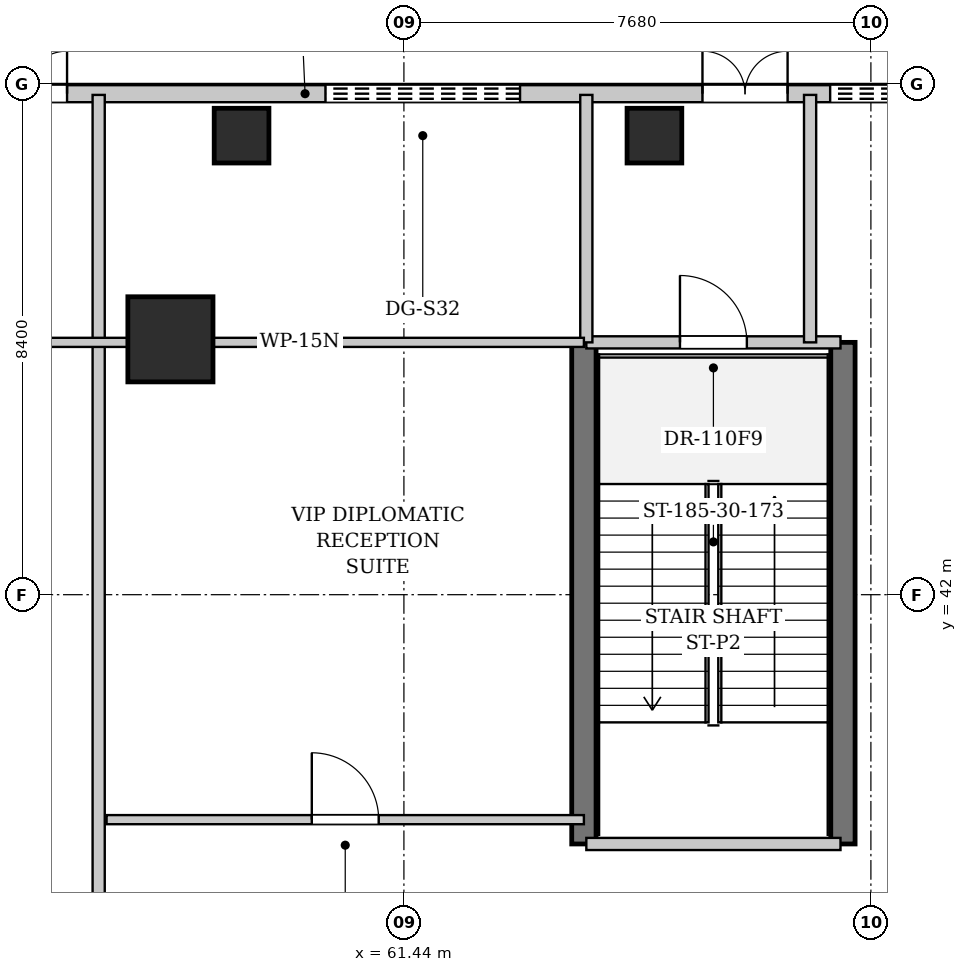
"""IFC4 building model, lengths in metres.
Left out: names, types, materials, properties, quantities, classifications, styles, units other than length and angle.
Written with IfcOpenShell. Run it as: python <this file> out.ifc"""

import sys

from ifc_helpers import new_model, si_unit, direction, frame, frame_2d, origin, origin_2d, place, context, subcontext, project, spatial, rectangle, extrude, element, fill, save


model = new_model("IFC4")
c1 = context("Model", 3, precision=1e-05, world=origin(), true_north=direction((0.0, 1.0)))
c2 = subcontext(c1, "Body", "Model", "MODEL_VIEW")
j1 = project(units=[si_unit("LENGTHUNIT", "METRE"), si_unit("PLANEANGLEUNIT", "RADIAN")], contexts=[c1])
p1 = place(None, origin())
s1 = spatial("IfcSite", under=j1, at=p1, CompositionType="ELEMENT")
p2 = place(p1, origin())
s2 = spatial("IfcBuilding", under=s1, at=p2, CompositionType="ELEMENT")
p3 = place(p2, origin())
s3 = spatial("IfcBuildingStorey", under=s2, at=p3, CompositionType="ELEMENT", Elevation=0.0)
for number, where, z_axis, x_axis in (
    (1, (64.4, 37.9, 0.0), (0.0, 0.0, 1.0), (0.0, 1.0, 0.0)),
    (2, (68.66, 37.9, 0.0), (0.0, 0.0, 1.0), (0.0, 1.0, 0.0)),
):
    element("IfcWall", number, at=place(p3, frame(where, z_axis=z_axis, x_axis=x_axis)), inside=s3, PredefinedType="SHEAR", context=c2, shape_type="SweptSolid", body=[
        extrude(rectangle(XDim=8.25, YDim=0.4, at=frame_2d((4.125, 0.0))), origin(), (0.0, 0.0, 1.0), 4.94),
    ])
p4 = place(p3, frame((57.6, 46.2, 0.0), z_axis=(0.0, 0.0, 1.0), x_axis=(1.0, 0.0, 0.0)))
e3 = element("IfcColumn", 3, at=p4, inside=s3, PredefinedType="COLUMN", context=c2, shape_type="SweptSolid", body=[
    extrude(rectangle(XDim=1.4, YDim=1.4, at=origin_2d()), origin(), (0.0, 0.0, 1.0), 5.2),
])
for number, where, z_axis, x_axis in (
    (4, (58.77, 49.55, 0.0), (0.0, 0.0, 1.0), (1.0, 0.0, 0.0)),
    (5, (65.56, 49.55, 0.0), (0.0, 0.0, 1.0), (1.0, 0.0, 0.0)),
):
    element("IfcColumn", number, at=place(p3, frame(where, z_axis=z_axis, x_axis=x_axis)), inside=s3, PredefinedType="COLUMN", context=c2, shape_type="SweptSolid", body=[
        extrude(rectangle(XDim=0.9, YDim=0.9, at=origin_2d()), origin(), (0.0, 0.0, 1.0), 5.2),
    ])
p5 = place(p3, frame((76.64, 50.24, 0.0), z_axis=(0.0, 0.0, 1.0), x_axis=(-1.0, 0.0, 0.0)))
e6 = element("IfcWall", 6, at=p5, inside=s3, PredefinedType="SOLIDWALL", context=c2, shape_type="SweptSolid", body=[
    extrude(rectangle(XDim=76.48, YDim=0.28, at=frame_2d((38.24, 0.0))), origin(), (0.0, 0.0, 1.0), 4.94),
])
p6 = place(p5, frame((69.14, 0.0, 0.0)))
e7 = element("IfcOpeningElement", 7, at=p6, cuts=e6, PredefinedType="OPENING", context=c2, shape_type="SweptSolid", body=[
    extrude(rectangle(XDim=6.2, YDim=4.5, at=frame_2d((3.1, 2.25))), frame((0.0, 0.15, 0.0), z_axis=(0.0, -1.0, 0.0), x_axis=(1.0, 0.0, 0.0)), (0.0, 0.0, 1.0), 0.3),
])
p7 = place(p5, frame((66.49, 0.0, 0.0)))
e8 = element("IfcOpeningElement", 8, at=p7, cuts=e6, PredefinedType="OPENING", context=c2, shape_type="SweptSolid", body=[
    extrude(rectangle(XDim=1.4, YDim=2.2, at=frame_2d((0.7, 1.1))), frame((0.0, 0.15, 0.0), z_axis=(0.0, -1.0, 0.0), x_axis=(1.0, 0.0, 0.0)), (0.0, 0.0, 1.0), 0.3),
])
p8 = place(p5, frame((56.39, 0.0, 0.0)))
e9 = element("IfcOpeningElement", 9, at=p8, cuts=e6, PredefinedType="OPENING", context=c2, shape_type="SweptSolid", body=[
    extrude(rectangle(XDim=1.4, YDim=2.2, at=frame_2d((0.7, 1.1))), frame((0.0, 0.15, 0.0), z_axis=(0.0, -1.0, 0.0), x_axis=(1.0, 0.0, 0.0)), (0.0, 0.0, 1.0), 0.3),
])
p9 = place(p5, frame((54.29, 0.0, 0.0)))
e10 = element("IfcOpeningElement", 10, at=p9, cuts=e6, PredefinedType="OPENING", context=c2, shape_type="SweptSolid", body=[
    extrude(rectangle(XDim=1.4, YDim=2.2, at=frame_2d((0.7, 1.1))), frame((0.0, 0.15, 0.0), z_axis=(0.0, -1.0, 0.0), x_axis=(1.0, 0.0, 0.0)), (0.0, 0.0, 1.0), 0.3),
])
p10 = place(p5, frame((20.74, 0.0, 0.0)))
e11 = element("IfcOpeningElement", 11, at=p10, cuts=e6, PredefinedType="OPENING", context=c2, shape_type="SweptSolid", body=[
    extrude(rectangle(XDim=1.4, YDim=2.2, at=frame_2d((0.7, 1.1))), frame((0.0, 0.15, 0.0), z_axis=(0.0, -1.0, 0.0), x_axis=(1.0, 0.0, 0.0)), (0.0, 0.0, 1.0), 0.3),
])
p11 = place(p5, frame((8.89, 0.0, 0.0)))
e12 = element("IfcOpeningElement", 12, at=p11, cuts=e6, PredefinedType="OPENING", context=c2, shape_type="SweptSolid", body=[
    extrude(rectangle(XDim=1.4, YDim=2.2, at=frame_2d((0.7, 1.1))), frame((0.0, 0.15, 0.0), z_axis=(0.0, -1.0, 0.0), x_axis=(1.0, 0.0, 0.0)), (0.0, 0.0, 1.0), 0.3),
])
p12 = place(p5, frame((60.09, 0.0, 0.0)))
e13 = element("IfcOpeningElement", 13, at=p12, cuts=e6, PredefinedType="OPENING", context=c2, shape_type="SweptSolid", body=[
    extrude(rectangle(XDim=3.2, YDim=3.4, at=frame_2d((1.6, 1.7))), frame((0.0, 0.15, 0.0), z_axis=(0.0, -1.0, 0.0), x_axis=(1.0, 0.0, 0.0)), (0.0, 0.0, 1.0), 0.3),
])
p13 = place(p5, frame((13.29, 0.0, 0.0)))
e14 = element("IfcOpeningElement", 14, at=p13, cuts=e6, PredefinedType="OPENING", context=c2, shape_type="SweptSolid", body=[
    extrude(rectangle(XDim=3.2, YDim=3.4, at=frame_2d((1.6, 1.7))), frame((0.0, 0.15, 0.0), z_axis=(0.0, -1.0, 0.0), x_axis=(1.0, 0.0, 0.0)), (0.0, 0.0, 1.0), 0.3),
])
p14 = place(p5, frame((4.99, 0.0, 0.0)))
e15 = element("IfcOpeningElement", 15, at=p14, cuts=e6, PredefinedType="OPENING", context=c2, shape_type="SweptSolid", body=[
    extrude(rectangle(XDim=3.2, YDim=3.4, at=frame_2d((1.6, 1.7))), frame((0.0, 0.15, 0.0), z_axis=(0.0, -1.0, 0.0), x_axis=(1.0, 0.0, 0.0)), (0.0, 0.0, 1.0), 0.3),
])
p15 = place(p3, frame((64.44, 37.9, 0.0), z_axis=(0.0, 0.0, 1.0), x_axis=(1.0, 0.0, 0.0)))
e16 = element("IfcWall", 16, at=p15, inside=s3, PredefinedType="PARTITIONING", context=c2, shape_type="SweptSolid", body=[
    extrude(rectangle(XDim=4.18, YDim=0.2, at=frame_2d((2.09, 0.0))), origin(), (0.0, 0.0, 1.0), 4.94),
])
p16 = place(p3, frame((64.44, 46.15, 0.0), z_axis=(0.0, 0.0, 1.0), x_axis=(1.0, 0.0, 0.0)))
e17 = element("IfcWall", 17, at=p16, inside=s3, PredefinedType="PARTITIONING", context=c2, shape_type="SweptSolid", body=[
    extrude(rectangle(XDim=4.18, YDim=0.2, at=frame_2d((2.09, 0.0))), origin(), (0.0, 0.0, 1.0), 4.94),
])
p17 = place(p16, frame((1.54, 0.0, 0.0)))
e18 = element("IfcOpeningElement", 18, at=p17, cuts=e17, PredefinedType="OPENING", context=c2, shape_type="SweptSolid", body=[
    extrude(rectangle(XDim=1.1, YDim=2.15, at=frame_2d((0.55, 1.075))), frame((0.0, 0.11, 0.0), z_axis=(0.0, -1.0, 0.0), x_axis=(1.0, 0.0, 0.0)), (0.0, 0.0, 1.0), 0.22),
])
for number, where, z_axis, x_axis in (
    (19, (64.44, 46.15, 0.0), (0.0, 0.0, 1.0), (0.0, 1.0, 0.0)),
    (20, (68.12, 46.15, 0.0), (0.0, 0.0, 1.0), (0.0, 1.0, 0.0)),
):
    element("IfcWall", number, at=place(p3, frame(where, z_axis=z_axis, x_axis=x_axis)), inside=s3, PredefinedType="PARTITIONING", context=c2, shape_type="SweptSolid", body=[
        extrude(rectangle(XDim=4.07, YDim=0.2, at=frame_2d((2.035, 0.0))), origin(), (0.0, 0.0, 1.0), 4.94),
    ])
p18 = place(p3, frame((56.42, 33.15, 0.0), z_axis=(0.0, 0.0, 1.0), x_axis=(0.0, 1.0, 0.0)))
e21 = element("IfcWall", 21, at=p18, inside=s3, PredefinedType="PARTITIONING", context=c2, shape_type="SweptSolid", body=[
    extrude(rectangle(XDim=17.07, YDim=0.2, at=frame_2d((8.535, 0.0))), origin(), (0.0, 0.0, 1.0), 4.94),
])
p19 = place(p3, frame((56.55, 38.3, 0.0), z_axis=(0.0, 0.0, 1.0), x_axis=(1.0, 0.0, 0.0)))
e22 = element("IfcWall", 22, at=p19, inside=s3, PredefinedType="PARTITIONING", context=c2, shape_type="SweptSolid", body=[
    extrude(rectangle(XDim=7.85, YDim=0.15, at=frame_2d((3.925, 0.0))), origin(), (0.0, 0.0, 1.0), 4.94),
])
p20 = place(p19, frame((3.375, 0.0, 0.0)))
e23 = element("IfcOpeningElement", 23, at=p20, cuts=e22, PredefinedType="OPENING", context=c2, shape_type="SweptSolid", body=[
    extrude(rectangle(XDim=1.1, YDim=2.15, at=frame_2d((0.55, 1.075))), frame((0.0, 0.085, 0.0), z_axis=(0.0, -1.0, 0.0), x_axis=(1.0, 0.0, 0.0)), (0.0, 0.0, 1.0), 0.17),
])
p21 = place(p3, frame((54.05, 46.15, 0.0), z_axis=(0.0, 0.0, 1.0), x_axis=(1.0, 0.0, 0.0)))
e24 = element("IfcWall", 24, at=p21, inside=s3, PredefinedType="PARTITIONING", context=c2, shape_type="SweptSolid", body=[
    extrude(rectangle(XDim=10.35, YDim=0.15, at=frame_2d((5.175, 0.0))), origin(), (0.0, 0.0, 1.0), 4.94),
])
p22 = place(p10, frame((1.4, 0.0, 0.0), z_axis=(0.0, 0.0, 1.0), x_axis=(-1.0, 0.0, 0.0)))
e25 = element("IfcDoor", 25, at=p22, inside=s3, OperationType="SINGLE_SWING_LEFT", PredefinedType="DOOR", context=c2, shape_type="SweptSolid", body=[
    extrude(rectangle(XDim=1.4, YDim=2.2, at=frame_2d((0.7, 1.1))), frame((0.0, 0.025, 0.0), z_axis=(0.0, -1.0, 0.0), x_axis=(1.0, 0.0, 0.0)), (0.0, 0.0, 1.0), 0.05),
])
fill(e11, e25)
p23 = place(p11, frame((1.4, 0.0, 0.0), z_axis=(0.0, 0.0, 1.0), x_axis=(-1.0, 0.0, 0.0)))
e26 = element("IfcDoor", 26, at=p23, inside=s3, OperationType="SINGLE_SWING_LEFT", PredefinedType="DOOR", context=c2, shape_type="SweptSolid", body=[
    extrude(rectangle(XDim=1.4, YDim=2.2, at=frame_2d((0.7, 1.1))), frame((0.0, 0.025, 0.0), z_axis=(0.0, -1.0, 0.0), x_axis=(1.0, 0.0, 0.0)), (0.0, 0.0, 1.0), 0.05),
])
fill(e12, e26)
p24 = place(p13, frame((3.2, 0.0, 0.0), z_axis=(0.0, 0.0, 1.0), x_axis=(-1.0, 0.0, 0.0)))
e27 = element("IfcDoor", 27, at=p24, inside=s3, OperationType="SINGLE_SWING_LEFT", PredefinedType="GATE", context=c2, shape_type="SweptSolid", body=[
    extrude(rectangle(XDim=3.2, YDim=3.4, at=frame_2d((1.6, 1.7))), frame((0.0, 0.025, 0.0), z_axis=(0.0, -1.0, 0.0), x_axis=(1.0, 0.0, 0.0)), (0.0, 0.0, 1.0), 0.05),
])
fill(e14, e27)
p25 = place(p14, frame((3.2, 0.0, 0.0), z_axis=(0.0, 0.0, 1.0), x_axis=(-1.0, 0.0, 0.0)))
e28 = element("IfcDoor", 28, at=p25, inside=s3, OperationType="SINGLE_SWING_LEFT", PredefinedType="GATE", context=c2, shape_type="SweptSolid", body=[
    extrude(rectangle(XDim=3.2, YDim=3.4, at=frame_2d((1.6, 1.7))), frame((0.0, 0.025, 0.0), z_axis=(0.0, -1.0, 0.0), x_axis=(1.0, 0.0, 0.0)), (0.0, 0.0, 1.0), 0.05),
])
fill(e15, e28)
p26 = place(p17, origin())
e29 = element("IfcDoor", 29, at=p26, inside=s3, OperationType="SINGLE_SWING_LEFT", PredefinedType="DOOR", context=c2, shape_type="SweptSolid", body=[
    extrude(rectangle(XDim=1.1, YDim=2.15, at=frame_2d((0.55, 1.075))), frame((0.0, 0.025, 0.0), z_axis=(0.0, -1.0, 0.0), x_axis=(1.0, 0.0, 0.0)), (0.0, 0.0, 1.0), 0.05),
])
fill(e18, e29)
p27 = place(p20, origin())
e30 = element("IfcDoor", 30, at=p27, inside=s3, OperationType="SINGLE_SWING_LEFT", PredefinedType="DOOR", context=c2, shape_type="SweptSolid", body=[
    extrude(rectangle(XDim=1.1, YDim=2.15, at=frame_2d((0.55, 1.075))), frame((0.0, 0.025, 0.0), z_axis=(0.0, -1.0, 0.0), x_axis=(1.0, 0.0, 0.0)), (0.0, 0.0, 1.0), 0.05),
])
fill(e23, e30)
save(model, sys.argv[1])
